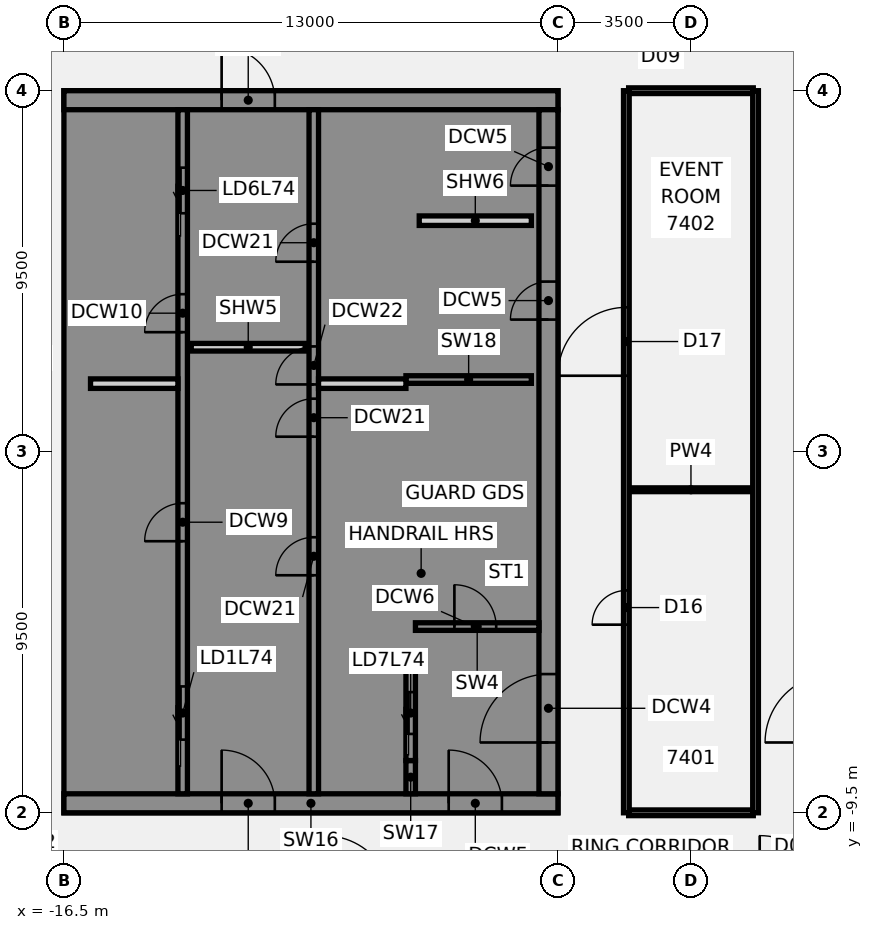
"""IFC4 building model, lengths in metres.
Left out: names, types, materials, properties, quantities, classifications, styles, units other than length and angle.
Written with IfcOpenShell. Run it as: python <this file> out.ifc"""

import sys

from ifc_helpers import new_model, si_unit, direction, frame, frame_2d, origin, place, context, subcontext, project, spatial, polyline, rectangle, outline, extrude, element, fill, save


model = new_model("IFC4")
c1 = context("Model", 3, precision=1e-05, world=origin(), true_north=direction((0.0, 1.0)))
c2 = subcontext(c1, "Body", "Model", "MODEL_VIEW")
j1 = project(units=[si_unit("LENGTHUNIT", "METRE"), si_unit("PLANEANGLEUNIT", "RADIAN")], contexts=[c1])
p1 = place(None, origin())
s1 = spatial("IfcSite", under=j1, at=p1, CompositionType="ELEMENT")
p2 = place(p1, origin())
s2 = spatial("IfcBuilding", under=s1, at=p2, CompositionType="ELEMENT")
p3 = place(p2, frame((0.0, 0.0, 299.4)))
s3 = spatial("IfcBuildingStorey", under=s2, at=p3, CompositionType="ELEMENT", Elevation=299.4)
p4 = place(p3, frame((-1.64, -9.5, 0.0), z_axis=(0.0, 0.0, 1.0), x_axis=(1.0, 0.0, 0.0)))
e1 = element("IfcWall", 1, at=p4, inside=s3, PredefinedType="PARTITIONING", context=c2, shape_type="SweptSolid", body=[
    extrude(rectangle(XDim=3.28, YDim=0.15, at=frame_2d((1.64, 0.0))), origin(), (0.0, 0.0, 1.0), 5.02),
])
p5 = place(p3, frame((-1.64, -1.0, 0.0), z_axis=(0.0, 0.0, 1.0), x_axis=(1.0, 0.0, 0.0)))
e2 = element("IfcWall", 2, at=p5, inside=s3, PredefinedType="PARTITIONING", context=c2, shape_type="SweptSolid", body=[
    extrude(rectangle(XDim=3.28, YDim=0.1, at=frame_2d((1.64, 0.0))), origin(), (0.0, 0.0, 1.0), 5.02),
])
p6 = place(p3, frame((-1.64, 9.5, 0.0), z_axis=(0.0, 0.0, 1.0), x_axis=(1.0, 0.0, 0.0)))
e3 = element("IfcWall", 3, at=p6, inside=s3, PredefinedType="PARTITIONING", context=c2, shape_type="SweptSolid", body=[
    extrude(rectangle(XDim=3.28, YDim=0.15, at=frame_2d((1.64, 0.0))), origin(), (0.0, 0.0, 1.0), 5.02),
])
p7 = place(p3, frame((-1.7, -9.5, 0.0), z_axis=(0.0, 0.0, 1.0), x_axis=(0.0, 1.0, 0.0)))
e4 = element("IfcWall", 4, at=p7, inside=s3, PredefinedType="PARTITIONING", context=c2, shape_type="SweptSolid", body=[
    extrude(rectangle(XDim=19.0, YDim=0.15, at=frame_2d((9.5, 0.0))), origin(), (0.0, 0.0, 1.0), 5.02),
])
p8 = place(p7, frame((4.95, 0.0, 0.0)))
e5 = element("IfcOpeningElement", 5, at=p8, cuts=e4, PredefinedType="OPENING", context=c2, shape_type="SweptSolid", body=[
    extrude(rectangle(XDim=0.9, YDim=2.1, at=frame_2d((0.45, 1.05))), frame((0.0, 0.085, 0.0), z_axis=(0.0, -1.0, 0.0), x_axis=(1.0, 0.0, 0.0)), (0.0, 0.0, 1.0), 0.17),
])
p9 = place(p7, frame((11.5, 0.0, 0.0)))
e6 = element("IfcOpeningElement", 6, at=p9, cuts=e4, PredefinedType="OPENING", context=c2, shape_type="SweptSolid", body=[
    extrude(rectangle(XDim=1.8, YDim=2.1, at=frame_2d((0.9, 1.05))), frame((0.0, 0.085, 0.0), z_axis=(0.0, -1.0, 0.0), x_axis=(1.0, 0.0, 0.0)), (0.0, 0.0, 1.0), 0.17),
])
p10 = place(p3, frame((1.7, -9.5, 0.0), z_axis=(0.0, 0.0, 1.0), x_axis=(0.0, 1.0, 0.0)))
e7 = element("IfcWall", 7, at=p10, inside=s3, PredefinedType="PARTITIONING", context=c2, shape_type="SweptSolid", body=[
    extrude(rectangle(XDim=19.0, YDim=0.15, at=frame_2d((9.5, 0.0))), origin(), (0.0, 0.0, 1.0), 5.02),
])
p11 = place(p3, frame((-16.5, -9.25, 0.0), z_axis=(0.0, 0.0, 1.0), x_axis=(1.0, 0.0, 0.0)))
e8 = element("IfcWall", 8, at=p11, inside=s3, PredefinedType="SHEAR", context=c2, shape_type="SweptSolid", body=[
    extrude(rectangle(XDim=13.0, YDim=0.5, at=frame_2d((6.5, 0.0))), origin(), (0.0, 0.0, 1.0), 5.82),
])
p12 = place(p11, frame((4.15, 0.0, 0.0)))
e9 = element("IfcOpeningElement", 9, at=p12, cuts=e8, PredefinedType="OPENING", context=c2, shape_type="SweptSolid", body=[
    extrude(rectangle(XDim=1.4, YDim=2.1, at=frame_2d((0.7, 1.05))), frame((0.0, 0.26, 0.0), z_axis=(0.0, -1.0, 0.0), x_axis=(1.0, 0.0, 0.0)), (0.0, 0.0, 1.0), 0.52),
])
p13 = place(p11, frame((10.125, 0.0, 0.0)))
e10 = element("IfcOpeningElement", 10, at=p13, cuts=e8, PredefinedType="OPENING", context=c2, shape_type="SweptSolid", body=[
    extrude(rectangle(XDim=1.4, YDim=2.1, at=frame_2d((0.7, 1.05))), frame((0.0, 0.26, 0.0), z_axis=(0.0, -1.0, 0.0), x_axis=(1.0, 0.0, 0.0)), (0.0, 0.0, 1.0), 0.52),
])
p14 = place(p3, frame((-16.5, 9.25, 0.0), z_axis=(0.0, 0.0, 1.0), x_axis=(1.0, 0.0, 0.0)))
e11 = element("IfcWall", 11, at=p14, inside=s3, PredefinedType="SHEAR", context=c2, shape_type="SweptSolid", body=[
    extrude(rectangle(XDim=13.0, YDim=0.5, at=frame_2d((6.5, 0.0))), origin(), (0.0, 0.0, 1.0), 5.82),
])
p15 = place(p14, frame((4.15, 0.0, 0.0)))
e12 = element("IfcOpeningElement", 12, at=p15, cuts=e11, PredefinedType="OPENING", context=c2, shape_type="SweptSolid", body=[
    extrude(rectangle(XDim=1.4, YDim=2.1, at=frame_2d((0.7, 1.05))), frame((0.0, 0.26, 0.0), z_axis=(0.0, -1.0, 0.0), x_axis=(1.0, 0.0, 0.0)), (0.0, 0.0, 1.0), 0.52),
])
p16 = place(p3, frame((-13.15, 2.75, 0.0), z_axis=(0.0, 0.0, 1.0), x_axis=(1.0, 0.0, 0.0)))
e13 = element("IfcWall", 13, at=p16, inside=s3, PredefinedType="PARTITIONING", context=c2, shape_type="SweptSolid", body=[
    extrude(rectangle(XDim=3.0, YDim=0.2, at=frame_2d((1.5, 0.0))), origin(), (0.0, 0.0, 1.0), 5.82),
])
p17 = place(p3, origin())
e14 = element("IfcWall", 14, at=p17, inside=s3, PredefinedType="SHEAR", context=c2, shape_type="SweptSolid", body=[
    extrude(outline(polyline([(-13.5, -8.125), (-16.0, -8.125), (-16.0, -5.625), (-13.5, -5.625), (-13.5, -5.375), (-16.0, -5.375), (-16.0, 5.375), (-13.5, 5.375), (-13.5, 5.625), (-16.0, 5.625), (-16.0, 8.125), (-13.5, 8.125), (-13.5, 9.0), (-16.0, 9.0), (-16.5, 9.0), (-16.5, -9.0), (-16.0, -9.0), (-13.5, -9.0), (-13.5, -8.125)])), origin(), (0.0, 0.0, 1.0), 5.82),
])
p18 = place(p3, origin())
e15 = element("IfcWall", 15, at=p18, inside=s3, PredefinedType="SHEAR", context=c2, shape_type="SweptSolid", body=[
    extrude(outline(polyline([(-9.8, -5.625), (-7.5, -5.625), (-7.25, -5.625), (-7.25, 9.0), (-7.5, 9.0), (-9.8, 9.0), (-9.8, 8.125), (-7.5, 8.125), (-7.5, -5.375), (-9.8, -5.375), (-9.8, -5.625)])), origin(), (0.0, 0.0, 1.0), 5.82),
])
p19 = place(p3, origin())
e16 = element("IfcWall", 16, at=p19, inside=s3, PredefinedType="SHEAR", context=c2, shape_type="SweptSolid", body=[
    extrude(outline(polyline([(-7.5, -8.125), (-9.55, -8.125), (-9.55, -5.625), (-9.8, -5.625), (-9.8, -8.125), (-9.8, -9.0), (-7.5, -9.0), (-7.5, -8.125)])), origin(), (0.0, 0.0, 1.0), 5.82),
])
p20 = place(p3, frame((-7.375, -9.0, 0.0), z_axis=(0.0, 0.0, 1.0), x_axis=(0.0, 1.0, 0.0)))
e17 = element("IfcWall", 17, at=p20, inside=s3, PredefinedType="SHEAR", context=c2, shape_type="SweptSolid", body=[
    extrude(rectangle(XDim=0.875, YDim=0.25, at=frame_2d((0.438, 0.0))), origin(), (0.0, 0.0, 1.0), 5.82),
])
p21 = place(p3, frame((-7.5, 1.9, 0.0), z_axis=(0.0, 0.0, 1.0), x_axis=(1.0, 0.0, 0.0)))
e18 = element("IfcWall", 18, at=p21, inside=s3, PredefinedType="SHEAR", context=c2, shape_type="SweptSolid", body=[
    extrude(rectangle(XDim=3.3, YDim=0.2, at=frame_2d((1.65, 0.0))), origin(), (0.0, 0.0, 1.0), 5.82),
])
p22 = place(p3, frame((-13.375, -9.0, 0.0), z_axis=(0.0, 0.0, 1.0), x_axis=(0.0, 1.0, 0.0)))
e19 = element("IfcWall", 19, at=p22, inside=s3, PredefinedType="SHEAR", context=c2, shape_type="SweptSolid", body=[
    extrude(rectangle(XDim=18.0, YDim=0.25, at=frame_2d((9.0, 0.0))), origin(), (0.0, 0.0, 1.0), 5.82),
])
p23 = place(p22, frame((1.425, 0.0, 0.0)))
e20 = element("IfcOpeningElement", 20, at=p23, cuts=e19, PredefinedType="OPENING", context=c2, shape_type="SweptSolid", body=[
    extrude(rectangle(XDim=1.4, YDim=2.1, at=frame_2d((0.7, 1.05))), frame((0.0, 0.135, 0.0), z_axis=(0.0, -1.0, 0.0), x_axis=(1.0, 0.0, 0.0)), (0.0, 0.0, 1.0), 0.27),
])
p24 = place(p22, frame((15.275, 0.0, 0.0)))
e21 = element("IfcOpeningElement", 21, at=p24, cuts=e19, PredefinedType="OPENING", context=c2, shape_type="SweptSolid", body=[
    extrude(rectangle(XDim=1.2, YDim=2.1, at=frame_2d((0.6, 1.05))), frame((0.0, 0.135, 0.0), z_axis=(0.0, -1.0, 0.0), x_axis=(1.0, 0.0, 0.0)), (0.0, 0.0, 1.0), 0.27),
])
p25 = place(p22, frame((6.646, 0.0, 0.0)))
e22 = element("IfcOpeningElement", 22, at=p25, cuts=e19, PredefinedType="OPENING", context=c2, shape_type="SweptSolid", body=[
    extrude(rectangle(XDim=1.0, YDim=2.1, at=frame_2d((0.5, 1.05))), frame((0.0, 0.135, 0.0), z_axis=(0.0, -1.0, 0.0), x_axis=(1.0, 0.0, 0.0)), (0.0, 0.0, 1.0), 0.27),
])
p26 = place(p22, frame((12.146, 0.0, 0.0)))
e23 = element("IfcOpeningElement", 23, at=p26, cuts=e19, PredefinedType="OPENING", context=c2, shape_type="SweptSolid", body=[
    extrude(rectangle(XDim=1.0, YDim=2.1, at=frame_2d((0.5, 1.05))), frame((0.0, 0.135, 0.0), z_axis=(0.0, -1.0, 0.0), x_axis=(1.0, 0.0, 0.0)), (0.0, 0.0, 1.0), 0.27),
])
p27 = place(p3, frame((-9.925, -9.0, 0.0), z_axis=(0.0, 0.0, 1.0), x_axis=(0.0, 1.0, 0.0)))
e24 = element("IfcWall", 24, at=p27, inside=s3, PredefinedType="SHEAR", context=c2, shape_type="SweptSolid", body=[
    extrude(rectangle(XDim=18.0, YDim=0.25, at=frame_2d((9.0, 0.0))), origin(), (0.0, 0.0, 1.0), 5.82),
])
p28 = place(p27, frame((5.75, 0.0, 0.0)))
e25 = element("IfcOpeningElement", 25, at=p28, cuts=e24, PredefinedType="OPENING", context=c2, shape_type="SweptSolid", body=[
    extrude(rectangle(XDim=1.0, YDim=2.1, at=frame_2d((0.5, 1.05))), frame((0.0, 0.135, 0.0), z_axis=(0.0, -1.0, 0.0), x_axis=(1.0, 0.0, 0.0)), (0.0, 0.0, 1.0), 0.27),
])
p29 = place(p27, frame((9.396, 0.0, 0.0)))
e26 = element("IfcOpeningElement", 26, at=p29, cuts=e24, PredefinedType="OPENING", context=c2, shape_type="SweptSolid", body=[
    extrude(rectangle(XDim=1.0, YDim=2.1, at=frame_2d((0.5, 1.05))), frame((0.0, 0.135, 0.0), z_axis=(0.0, -1.0, 0.0), x_axis=(1.0, 0.0, 0.0)), (0.0, 0.0, 1.0), 0.27),
])
p30 = place(p27, frame((10.771, 0.0, 0.0)))
e27 = element("IfcOpeningElement", 27, at=p30, cuts=e24, PredefinedType="OPENING", context=c2, shape_type="SweptSolid", body=[
    extrude(rectangle(XDim=1.0, YDim=2.1, at=frame_2d((0.5, 1.05))), frame((0.0, 0.135, 0.0), z_axis=(0.0, -1.0, 0.0), x_axis=(1.0, 0.0, 0.0)), (0.0, 0.0, 1.0), 0.27),
])
p31 = place(p27, frame((14.0, 0.0, 0.0)))
e28 = element("IfcOpeningElement", 28, at=p31, cuts=e24, PredefinedType="OPENING", context=c2, shape_type="SweptSolid", body=[
    extrude(rectangle(XDim=1.0, YDim=2.1, at=frame_2d((0.5, 1.05))), frame((0.0, 0.135, 0.0), z_axis=(0.0, -1.0, 0.0), x_axis=(1.0, 0.0, 0.0)), (0.0, 0.0, 1.0), 0.27),
])
p32 = place(p3, frame((-7.375, -8.125, 0.0), z_axis=(0.0, 0.0, 1.0), x_axis=(0.0, 1.0, 0.0)))
e29 = element("IfcWall", 29, at=p32, inside=s3, PredefinedType="SHEAR", context=c2, shape_type="SweptSolid", body=[
    extrude(rectangle(XDim=2.5, YDim=0.25, at=frame_2d((1.25, 0.0))), origin(), (0.0, 0.0, 1.0), 5.82),
])
p33 = place(p32, frame((0.7, 0.0, 0.0)))
e30 = element("IfcOpeningElement", 30, at=p33, cuts=e29, PredefinedType="OPENING", context=c2, shape_type="SweptSolid", body=[
    extrude(rectangle(XDim=1.1, YDim=2.1, at=frame_2d((0.55, 1.05))), frame((0.0, 0.135, 0.0), z_axis=(0.0, -1.0, 0.0), x_axis=(1.0, 0.0, 0.0)), (0.0, 0.0, 1.0), 0.27),
])
p34 = place(p3, frame((-3.75, -9.0, 0.0), z_axis=(0.0, 0.0, 1.0), x_axis=(0.0, 1.0, 0.0)))
e31 = element("IfcWall", 31, at=p34, inside=s3, PredefinedType="SHEAR", context=c2, shape_type="SweptSolid", body=[
    extrude(rectangle(XDim=18.0, YDim=0.5, at=frame_2d((9.0, 0.0))), origin(), (0.0, 0.0, 1.0), 5.82),
])
p35 = place(p34, frame((1.35, 0.0, 0.0)))
e32 = element("IfcOpeningElement", 32, at=p35, cuts=e31, PredefinedType="OPENING", context=c2, shape_type="SweptSolid", body=[
    extrude(rectangle(XDim=1.8, YDim=2.1, at=frame_2d((0.9, 1.05))), frame((0.0, 0.26, 0.0), z_axis=(0.0, -1.0, 0.0), x_axis=(1.0, 0.0, 0.0)), (0.0, 0.0, 1.0), 0.52),
])
p36 = place(p34, frame((12.478, 0.0, 0.0)))
e33 = element("IfcOpeningElement", 33, at=p36, cuts=e31, PredefinedType="OPENING", context=c2, shape_type="SweptSolid", body=[
    extrude(rectangle(XDim=1.0, YDim=2.1, at=frame_2d((0.5, 1.05))), frame((0.0, 0.26, 0.0), z_axis=(0.0, -1.0, 0.0), x_axis=(1.0, 0.0, 0.0)), (0.0, 0.0, 1.0), 0.52),
])
p37 = place(p34, frame((16.002, 0.0, 0.0)))
e34 = element("IfcOpeningElement", 34, at=p37, cuts=e31, PredefinedType="OPENING", context=c2, shape_type="SweptSolid", body=[
    extrude(rectangle(XDim=1.0, YDim=2.1, at=frame_2d((0.5, 1.05))), frame((0.0, 0.26, 0.0), z_axis=(0.0, -1.0, 0.0), x_axis=(1.0, 0.0, 0.0)), (0.0, 0.0, 1.0), 0.52),
])
p38 = place(p3, frame((-7.15, 6.08, 0.0), z_axis=(0.0, 0.0, 1.0), x_axis=(1.0, 0.0, 0.0)))
e35 = element("IfcWall", 35, at=p38, inside=s3, PredefinedType="PARTITIONING", context=c2, shape_type="SweptSolid", body=[
    extrude(rectangle(XDim=2.95, YDim=0.25, at=frame_2d((1.475, 0.0))), origin(), (0.0, 0.0, 1.0), 5.82),
])
p39 = place(p3, frame((-7.25, -4.6, 0.0), z_axis=(0.0, 0.0, 1.0), x_axis=(1.0, 0.0, 0.0)))
e36 = element("IfcWall", 36, at=p39, inside=s3, PredefinedType="SHEAR", context=c2, shape_type="SweptSolid", body=[
    extrude(rectangle(XDim=3.25, YDim=0.2, at=frame_2d((1.625, 0.0))), origin(), (0.0, 0.0, 1.0), 5.82),
])
p40 = place(p39, frame((1.025, 0.0, 0.0)))
e37 = element("IfcOpeningElement", 37, at=p40, cuts=e36, PredefinedType="OPENING", context=c2, shape_type="SweptSolid", body=[
    extrude(rectangle(XDim=1.1, YDim=2.1, at=frame_2d((0.55, 1.05))), frame((0.0, 0.11, 0.0), z_axis=(0.0, -1.0, 0.0), x_axis=(1.0, 0.0, 0.0)), (0.0, 0.0, 1.0), 0.22),
])
for number, where, z_axis, x_axis in (
    (38, (-15.8, 1.792, 0.0), (0.0, 0.0, 1.0), (1.0, 0.0, 0.0)),
    (39, (-9.8, 1.792, 0.0), (0.0, 0.0, 1.0), (1.0, 0.0, 0.0)),
):
    element("IfcWall", number, at=place(p3, frame(where, z_axis=z_axis, x_axis=x_axis)), inside=s3, PredefinedType="PARTITIONING", context=c2, shape_type="SweptSolid", body=[
        extrude(rectangle(XDim=2.3, YDim=0.25, at=frame_2d((1.15, 0.0))), origin(), (0.0, 0.0, 1.0), 5.82),
    ])
p41 = place(p8, frame((0.9, 0.0, 0.0), z_axis=(0.0, 0.0, 1.0), x_axis=(-1.0, 0.0, 0.0)))
e40 = element("IfcDoor", 40, at=p41, inside=s3, OperationType="SINGLE_SWING_LEFT", PredefinedType="DOOR", context=c2, shape_type="SweptSolid", body=[
    extrude(rectangle(XDim=0.9, YDim=2.1, at=frame_2d((0.45, 1.05))), frame((0.0, 0.025, 0.0), z_axis=(0.0, -1.0, 0.0), x_axis=(1.0, 0.0, 0.0)), (0.0, 0.0, 1.0), 0.05),
])
fill(e5, e40)
p42 = place(p9, frame((1.8, 0.0, 0.0), z_axis=(0.0, 0.0, 1.0), x_axis=(-1.0, 0.0, 0.0)))
e41 = element("IfcDoor", 41, at=p42, inside=s3, OperationType="DOUBLE_DOOR_SINGLE_SWING", PredefinedType="DOOR", context=c2, shape_type="SweptSolid", body=[
    extrude(rectangle(XDim=1.8, YDim=2.1, at=frame_2d((0.9, 1.05))), frame((0.0, 0.025, 0.0), z_axis=(0.0, -1.0, 0.0), x_axis=(1.0, 0.0, 0.0)), (0.0, 0.0, 1.0), 0.05),
])
fill(e6, e41)
p43 = place(p12, origin())
e42 = element("IfcDoor", 42, at=p43, inside=s3, OperationType="SINGLE_SWING_LEFT", PredefinedType="DOOR", context=c2, shape_type="SweptSolid", body=[
    extrude(rectangle(XDim=1.4, YDim=2.1, at=frame_2d((0.7, 1.05))), frame((0.0, 0.025, 0.0), z_axis=(0.0, -1.0, 0.0), x_axis=(1.0, 0.0, 0.0)), (0.0, 0.0, 1.0), 0.05),
])
fill(e9, e42)
p44 = place(p13, origin())
e43 = element("IfcDoor", 43, at=p44, inside=s3, OperationType="SINGLE_SWING_LEFT", PredefinedType="DOOR", context=c2, shape_type="SweptSolid", body=[
    extrude(rectangle(XDim=1.4, YDim=2.1, at=frame_2d((0.7, 1.05))), frame((0.0, 0.025, 0.0), z_axis=(0.0, -1.0, 0.0), x_axis=(1.0, 0.0, 0.0)), (0.0, 0.0, 1.0), 0.05),
])
fill(e10, e43)
p45 = place(p15, origin())
e44 = element("IfcDoor", 44, at=p45, inside=s3, OperationType="SINGLE_SWING_LEFT", PredefinedType="DOOR", context=c2, shape_type="SweptSolid", body=[
    extrude(rectangle(XDim=1.4, YDim=2.1, at=frame_2d((0.7, 1.05))), frame((0.0, 0.025, 0.0), z_axis=(0.0, -1.0, 0.0), x_axis=(1.0, 0.0, 0.0)), (0.0, 0.0, 1.0), 0.05),
])
fill(e12, e44)
p46 = place(p35, origin())
e45 = element("IfcDoor", 45, at=p46, inside=s3, OperationType="SINGLE_SWING_LEFT", PredefinedType="DOOR", context=c2, shape_type="SweptSolid", body=[
    extrude(rectangle(XDim=1.8, YDim=2.1, at=frame_2d((0.9, 1.05))), frame((0.0, 0.025, 0.0), z_axis=(0.0, -1.0, 0.0), x_axis=(1.0, 0.0, 0.0)), (0.0, 0.0, 1.0), 0.05),
])
fill(e32, e45)
p47 = place(p36, origin())
e46 = element("IfcDoor", 46, at=p47, inside=s3, OperationType="SINGLE_SWING_LEFT", PredefinedType="DOOR", context=c2, shape_type="SweptSolid", body=[
    extrude(rectangle(XDim=1.0, YDim=2.1, at=frame_2d((0.5, 1.05))), frame((0.0, 0.225, 0.0), z_axis=(0.0, -1.0, 0.0), x_axis=(1.0, 0.0, 0.0)), (0.0, 0.0, 1.0), 0.05),
])
fill(e33, e46)
p48 = place(p37, origin())
e47 = element("IfcDoor", 47, at=p48, inside=s3, OperationType="SINGLE_SWING_LEFT", PredefinedType="DOOR", context=c2, shape_type="SweptSolid", body=[
    extrude(rectangle(XDim=1.0, YDim=2.1, at=frame_2d((0.5, 1.05))), frame((0.0, 0.225, 0.0), z_axis=(0.0, -1.0, 0.0), x_axis=(1.0, 0.0, 0.0)), (0.0, 0.0, 1.0), 0.05),
])
fill(e34, e47)
p49 = place(p40, origin())
e48 = element("IfcDoor", 48, at=p49, inside=s3, OperationType="SINGLE_SWING_LEFT", PredefinedType="DOOR", context=c2, shape_type="SweptSolid", body=[
    extrude(rectangle(XDim=1.1, YDim=2.1, at=frame_2d((0.55, 1.05))), frame((0.0, 0.025, 0.0), z_axis=(0.0, -1.0, 0.0), x_axis=(1.0, 0.0, 0.0)), (0.0, 0.0, 1.0), 0.05),
])
fill(e37, e48)
p50 = place(p23, origin())
e49 = element("IfcDoor", 49, at=p50, inside=s3, OperationType="SLIDING_TO_LEFT", PredefinedType="DOOR", context=c2, shape_type="SweptSolid", body=[
    extrude(rectangle(XDim=1.4, YDim=2.1, at=frame_2d((0.7, 1.05))), frame((0.0, 0.025, 0.0), z_axis=(0.0, -1.0, 0.0), x_axis=(1.0, 0.0, 0.0)), (0.0, 0.0, 1.0), 0.05),
])
fill(e20, e49)
p51 = place(p24, origin())
e50 = element("IfcDoor", 50, at=p51, inside=s3, OperationType="SLIDING_TO_LEFT", PredefinedType="DOOR", context=c2, shape_type="SweptSolid", body=[
    extrude(rectangle(XDim=1.2, YDim=2.1, at=frame_2d((0.6, 1.05))), frame((0.0, 0.025, 0.0), z_axis=(0.0, -1.0, 0.0), x_axis=(1.0, 0.0, 0.0)), (0.0, 0.0, 1.0), 0.05),
])
fill(e21, e50)
p52 = place(p33, origin())
e51 = element("IfcDoor", 51, at=p52, inside=s3, OperationType="SLIDING_TO_LEFT", PredefinedType="DOOR", context=c2, shape_type="SweptSolid", body=[
    extrude(rectangle(XDim=1.1, YDim=2.1, at=frame_2d((0.55, 1.05))), frame((0.0, 0.025, 0.0), z_axis=(0.0, -1.0, 0.0), x_axis=(1.0, 0.0, 0.0)), (0.0, 0.0, 1.0), 0.05),
])
fill(e30, e51)
p53 = place(p25, origin())
e52 = element("IfcDoor", 52, at=p53, inside=s3, OperationType="SINGLE_SWING_LEFT", PredefinedType="DOOR", context=c2, shape_type="SweptSolid", body=[
    extrude(rectangle(XDim=1.0, YDim=2.1, at=frame_2d((0.5, 1.05))), frame((0.0, 0.025, 0.0), z_axis=(0.0, -1.0, 0.0), x_axis=(1.0, 0.0, 0.0)), (0.0, 0.0, 1.0), 0.05),
])
fill(e22, e52)
p54 = place(p26, origin())
e53 = element("IfcDoor", 53, at=p54, inside=s3, OperationType="SINGLE_SWING_LEFT", PredefinedType="DOOR", context=c2, shape_type="SweptSolid", body=[
    extrude(rectangle(XDim=1.0, YDim=2.1, at=frame_2d((0.5, 1.05))), frame((0.0, 0.025, 0.0), z_axis=(0.0, -1.0, 0.0), x_axis=(1.0, 0.0, 0.0)), (0.0, 0.0, 1.0), 0.05),
])
fill(e23, e53)
p55 = place(p28, origin())
e54 = element("IfcDoor", 54, at=p55, inside=s3, OperationType="SINGLE_SWING_LEFT", PredefinedType="DOOR", context=c2, shape_type="SweptSolid", body=[
    extrude(rectangle(XDim=1.0, YDim=2.1, at=frame_2d((0.5, 1.05))), frame((0.0, 0.025, 0.0), z_axis=(0.0, -1.0, 0.0), x_axis=(1.0, 0.0, 0.0)), (0.0, 0.0, 1.0), 0.05),
])
fill(e25, e54)
p56 = place(p29, origin())
e55 = element("IfcDoor", 55, at=p56, inside=s3, OperationType="SINGLE_SWING_LEFT", PredefinedType="DOOR", context=c2, shape_type="SweptSolid", body=[
    extrude(rectangle(XDim=1.0, YDim=2.1, at=frame_2d((0.5, 1.05))), frame((0.0, 0.025, 0.0), z_axis=(0.0, -1.0, 0.0), x_axis=(1.0, 0.0, 0.0)), (0.0, 0.0, 1.0), 0.05),
])
fill(e26, e55)
p57 = place(p30, origin())
e56 = element("IfcDoor", 56, at=p57, inside=s3, OperationType="SINGLE_SWING_LEFT", PredefinedType="DOOR", context=c2, shape_type="SweptSolid", body=[
    extrude(rectangle(XDim=1.0, YDim=2.1, at=frame_2d((0.5, 1.05))), frame((0.0, 0.025, 0.0), z_axis=(0.0, -1.0, 0.0), x_axis=(1.0, 0.0, 0.0)), (0.0, 0.0, 1.0), 0.05),
])
fill(e27, e56)
p58 = place(p31, origin())
e57 = element("IfcDoor", 57, at=p58, inside=s3, OperationType="SINGLE_SWING_LEFT", PredefinedType="DOOR", context=c2, shape_type="SweptSolid", body=[
    extrude(rectangle(XDim=1.0, YDim=2.1, at=frame_2d((0.5, 1.05))), frame((0.0, 0.025, 0.0), z_axis=(0.0, -1.0, 0.0), x_axis=(1.0, 0.0, 0.0)), (0.0, 0.0, 1.0), 0.05),
])
fill(e28, e57)
save(model, sys.argv[1])
